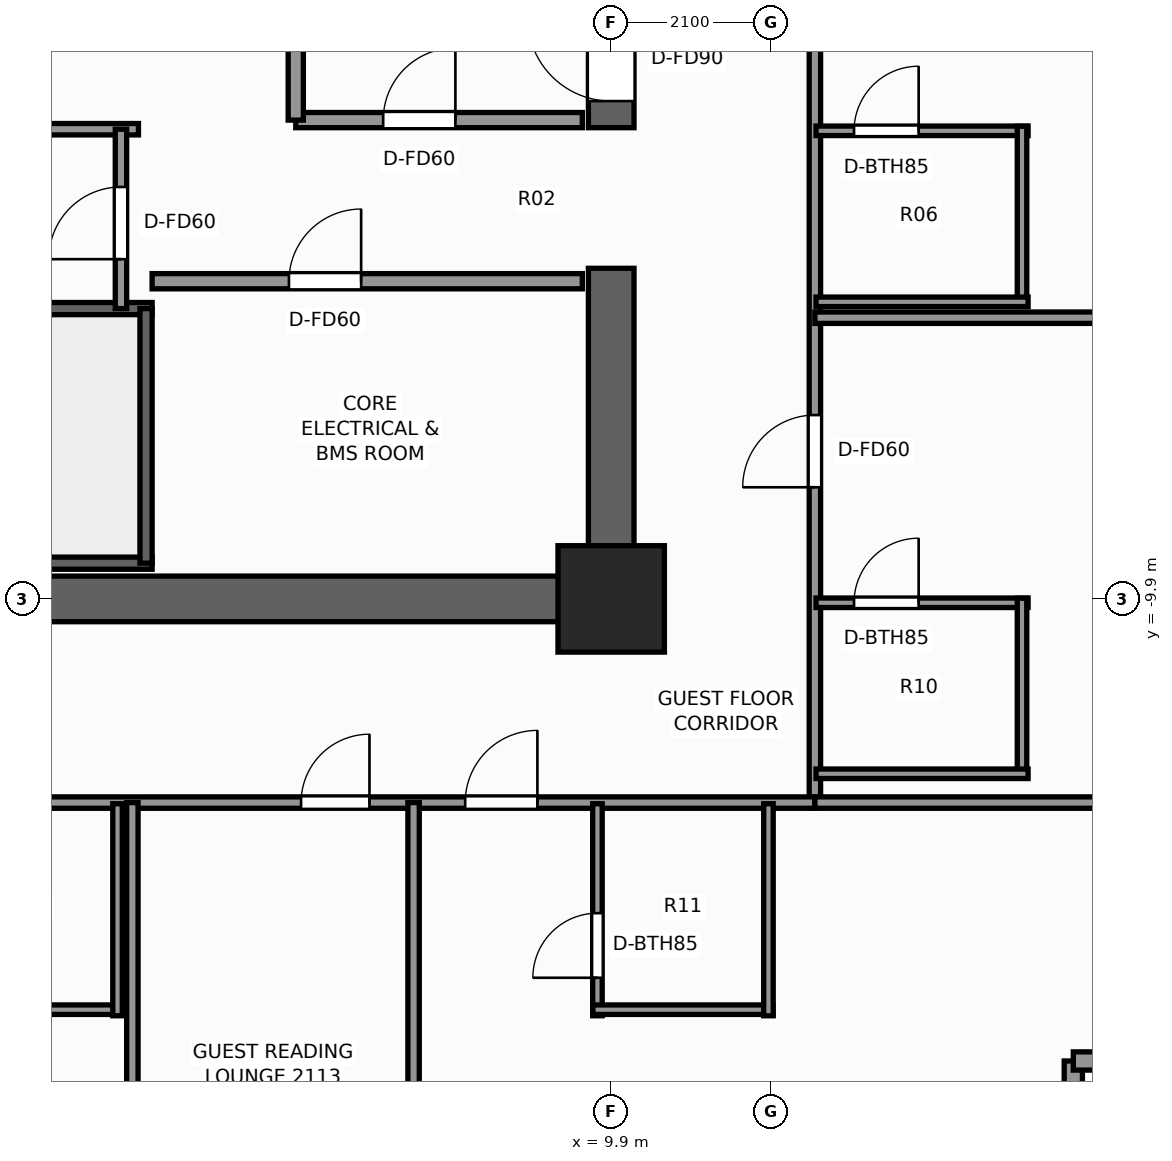
"""IFC4 building model, lengths in metres.
Left out: names, types, materials, properties, quantities, classifications, styles, units other than length and angle.
Written with IfcOpenShell. Run it as: python <this file> out.ifc"""

import sys

from ifc_helpers import new_model, si_unit, direction, frame, frame_2d, origin, origin_2d, place, context, subcontext, project, spatial, rectangle, extrude, element, fill, save


model = new_model("IFC4")
c1 = context("Model", 3, precision=1e-05, world=origin(), true_north=direction((0.0, 1.0)))
c2 = subcontext(c1, "Body", "Model", "MODEL_VIEW")
j1 = project(units=[si_unit("LENGTHUNIT", "METRE"), si_unit("PLANEANGLEUNIT", "RADIAN")], contexts=[c1])
p1 = place(None, origin())
s1 = spatial("IfcSite", under=j1, at=p1, CompositionType="ELEMENT")
p2 = place(p1, origin())
s2 = spatial("IfcBuilding", under=s1, at=p2, CompositionType="ELEMENT")
p3 = place(p2, frame((0.0, 0.0, 75.5)))
s3 = spatial("IfcBuildingStorey", under=s2, at=p3, CompositionType="ELEMENT", Elevation=75.5)
p4 = place(p3, frame((10.2, -9.9, 0.0), z_axis=(0.0, 0.0, 1.0), x_axis=(-1.0, 0.0, 0.0)))
e1 = element("IfcWall", 1, at=p4, inside=s3, PredefinedType="SHEAR", context=c2, shape_type="SweptSolid", body=[
    extrude(rectangle(XDim=12.06, YDim=0.6, at=frame_2d((6.03, 0.0))), origin(), (0.0, 0.0, 1.0), 3.3),
])
p5 = place(p3, frame((9.9, -9.6, 0.0), z_axis=(0.0, 0.0, 1.0), x_axis=(0.0, 1.0, 0.0)))
e2 = element("IfcWall", 2, at=p5, inside=s3, PredefinedType="SHEAR", context=c2, shape_type="SweptSolid", body=[
    extrude(rectangle(XDim=4.05, YDim=0.6, at=frame_2d((2.025, 0.0))), origin(), (0.0, 0.0, 1.0), 3.3),
])
p6 = place(p3, frame((9.9, -3.7, 0.0), z_axis=(0.0, 0.0, 1.0), x_axis=(0.0, 1.0, 0.0)))
e3 = element("IfcWall", 3, at=p6, inside=s3, PredefinedType="SHEAR", context=c2, shape_type="SweptSolid", body=[
    extrude(rectangle(XDim=13.3, YDim=0.6, at=frame_2d((6.65, 0.0))), origin(), (0.0, 0.0, 1.0), 3.3),
])
p7 = place(p6, frame((0.35, 0.0, 0.0)))
e4 = element("IfcOpeningElement", 4, at=p7, cuts=e3, PredefinedType="OPENING", context=c2, shape_type="SweptSolid", body=[
    extrude(rectangle(XDim=1.1, YDim=2.2, at=frame_2d((0.55, 1.1))), frame((0.0, 0.31, 0.0), z_axis=(0.0, -1.0, 0.0), x_axis=(1.0, 0.0, 0.0)), (0.0, 0.0, 1.0), 0.62),
])
p8 = place(p3, frame((9.9, -9.9, 0.0), z_axis=(0.0, 0.0, 1.0), x_axis=(1.0, 0.0, 0.0)))
e5 = element("IfcColumn", 5, at=p8, inside=s3, PredefinedType="COLUMN", context=c2, shape_type="SweptSolid", body=[
    extrude(rectangle(XDim=1.4, YDim=1.4, at=origin_2d()), origin(), (0.0, 0.0, 1.0), 3.3),
])
p9 = place(p3, frame((15.98, -15.98, 0.0), z_axis=(0.0, 0.0, 1.0), x_axis=(0.0, -1.0, 0.0)))
e6 = element("IfcWall", 6, at=p9, inside=s3, PredefinedType="STANDARD", context=c2, shape_type="SweptSolid", body=[
    extrude(rectangle(XDim=2.39, YDim=0.24, at=frame_2d((1.195, 0.0))), origin(), (0.0, 0.0, 1.0), 2.459),
])
p10 = place(p9, frame((0.525, 0.0, 0.65)))
e7 = element("IfcOpeningElement", 7, at=p10, cuts=e6, PredefinedType="OPENING", context=c2, shape_type="SweptSolid", body=[
    extrude(rectangle(XDim=1.1, YDim=1.45, at=frame_2d((0.55, 0.725))), frame((0.0, 0.13, 0.0), z_axis=(0.0, -1.0, 0.0), x_axis=(1.0, 0.0, 0.0)), (0.0, 0.0, 1.0), 0.26),
])
p11 = place(p3, frame((18.37, -15.98, 0.0), z_axis=(0.0, 0.0, 1.0), x_axis=(-1.0, 0.0, 0.0)))
e8 = element("IfcWall", 8, at=p11, inside=s3, PredefinedType="STANDARD", context=c2, shape_type="SweptSolid", body=[
    extrude(rectangle(XDim=2.39, YDim=0.24, at=frame_2d((1.195, 0.0))), origin(), (0.0, 0.0, 1.0), 2.459),
])
p12 = place(p11, frame((0.525, 0.0, 0.65)))
e9 = element("IfcOpeningElement", 9, at=p12, cuts=e8, PredefinedType="OPENING", context=c2, shape_type="SweptSolid", body=[
    extrude(rectangle(XDim=1.1, YDim=1.45, at=frame_2d((0.55, 0.725))), frame((0.0, 0.13, 0.0), z_axis=(0.0, -1.0, 0.0), x_axis=(1.0, 0.0, 0.0)), (0.0, 0.0, 1.0), 0.26),
])
p13 = place(p3, frame((3.86, -9.43, 0.0), z_axis=(0.0, 0.0, 1.0), x_axis=(-1.0, 0.0, 0.0)))
e10 = element("IfcWall", 10, at=p13, inside=s3, PredefinedType="SHEAR", context=c2, shape_type="SweptSolid", body=[
    extrude(rectangle(XDim=7.72, YDim=0.16, at=frame_2d((3.86, 0.0))), origin(), (0.0, 0.0, 1.0), 3.3),
])
p14 = place(p13, frame((6.01, 0.0, 0.0)))
e11 = element("IfcOpeningElement", 11, at=p14, cuts=e10, PredefinedType="OPENING", context=c2, shape_type="SweptSolid", body=[
    extrude(rectangle(XDim=1.1, YDim=2.2, at=frame_2d((0.55, 1.1))), frame((0.0, 0.09, 0.0), z_axis=(0.0, -1.0, 0.0), x_axis=(1.0, 0.0, 0.0)), (0.0, 0.0, 1.0), 0.18),
])
p15 = place(p3, frame((-3.86, -6.08, 0.0), z_axis=(0.0, 0.0, 1.0), x_axis=(1.0, 0.0, 0.0)))
e12 = element("IfcWall", 12, at=p15, inside=s3, PredefinedType="SHEAR", context=c2, shape_type="SweptSolid", body=[
    extrude(rectangle(XDim=7.72, YDim=0.16, at=frame_2d((3.86, 0.0))), origin(), (0.0, 0.0, 1.0), 3.3),
])
p16 = place(p3, frame((3.78, -9.43, 0.0), z_axis=(0.0, 0.0, 1.0), x_axis=(0.0, 1.0, 0.0)))
e13 = element("IfcWall", 13, at=p16, inside=s3, PredefinedType="SHEAR", context=c2, shape_type="SweptSolid", body=[
    extrude(rectangle(XDim=3.35, YDim=0.16, at=frame_2d((1.675, 0.0))), origin(), (0.0, 0.0, 1.0), 3.3),
])
p17 = place(p3, frame((5.75, -3.6, 0.0), z_axis=(0.0, 0.0, 1.0), x_axis=(1.0, 0.0, 0.0)))
e14 = element("IfcWall", 14, at=p17, inside=s3, PredefinedType="SOLIDWALL", context=c2, shape_type="SweptSolid", body=[
    extrude(rectangle(XDim=3.77, YDim=0.2, at=frame_2d((1.885, 0.0))), origin(), (0.0, 0.0, 1.0), 3.08),
])
p18 = place(p17, frame((1.15, 0.0, 0.0)))
e15 = element("IfcOpeningElement", 15, at=p18, cuts=e14, PredefinedType="OPENING", context=c2, shape_type="SweptSolid", body=[
    extrude(rectangle(XDim=0.95, YDim=2.06, at=frame_2d((0.475, 1.03))), frame((0.0, 0.11, 0.0), z_axis=(0.0, -1.0, 0.0), x_axis=(1.0, 0.0, 0.0)), (0.0, 0.0, 1.0), 0.22),
])
p19 = place(p3, frame((5.75, -3.6, 0.0), z_axis=(0.0, 0.0, 1.0), x_axis=(0.0, 1.0, 0.0)))
e16 = element("IfcWall", 16, at=p19, inside=s3, PredefinedType="SOLIDWALL", context=c2, shape_type="SweptSolid", body=[
    extrude(rectangle(XDim=5.57, YDim=0.2, at=frame_2d((2.785, 0.0))), origin(), (0.0, 0.0, 1.0), 3.08),
])
p20 = place(p19, frame((2.75, 0.0, 0.0)))
e17 = element("IfcOpeningElement", 17, at=p20, cuts=e16, PredefinedType="OPENING", context=c2, shape_type="SweptSolid", body=[
    extrude(rectangle(XDim=1.1, YDim=2.2, at=frame_2d((0.55, 1.1))), frame((0.0, 0.11, 0.0), z_axis=(0.0, -1.0, 0.0), x_axis=(1.0, 0.0, 0.0)), (0.0, 0.0, 1.0), 0.22),
])
p21 = place(p3, frame((3.86, -5.72, 0.0), z_axis=(0.0, 0.0, 1.0), x_axis=(1.0, 0.0, 0.0)))
e18 = element("IfcWall", 18, at=p21, inside=s3, PredefinedType="SOLIDWALL", context=c2, shape_type="SweptSolid", body=[
    extrude(rectangle(XDim=5.66, YDim=0.2, at=frame_2d((2.83, 0.0))), origin(), (0.0, 0.0, 1.0), 3.08),
])
p22 = place(p21, frame((1.8, 0.0, 0.0)))
e19 = element("IfcOpeningElement", 19, at=p22, cuts=e18, PredefinedType="OPENING", context=c2, shape_type="SweptSolid", body=[
    extrude(rectangle(XDim=0.95, YDim=2.06, at=frame_2d((0.475, 1.03))), frame((0.0, 0.11, 0.0), z_axis=(0.0, -1.0, 0.0), x_axis=(1.0, 0.0, 0.0)), (0.0, 0.0, 1.0), 0.22),
])
p23 = place(p3, frame((-3.68, -3.72, 0.0), z_axis=(0.0, 0.0, 1.0), x_axis=(1.0, 0.0, 0.0)))
e20 = element("IfcWall", 20, at=p23, inside=s3, PredefinedType="PARTITIONING", context=c2, shape_type="SweptSolid", body=[
    extrude(rectangle(XDim=7.36, YDim=0.15, at=frame_2d((3.68, 0.0))), origin(), (0.0, 0.0, 1.0), 3.08),
])
p24 = place(p3, frame((3.45, -6.08, 0.0), z_axis=(0.0, 0.0, 1.0), x_axis=(0.0, 1.0, 0.0)))
e21 = element("IfcWall", 21, at=p24, inside=s3, PredefinedType="PARTITIONING", context=c2, shape_type="SweptSolid", body=[
    extrude(rectangle(XDim=2.36, YDim=0.15, at=frame_2d((1.18, 0.0))), origin(), (0.0, 0.0, 1.0), 3.08),
])
p25 = place(p24, frame((0.65, 0.0, 0.0)))
e22 = element("IfcOpeningElement", 22, at=p25, cuts=e21, PredefinedType="OPENING", context=c2, shape_type="SweptSolid", body=[
    extrude(rectangle(XDim=0.95, YDim=2.06, at=frame_2d((0.475, 1.03))), frame((0.0, 0.085, 0.0), z_axis=(0.0, -1.0, 0.0), x_axis=(1.0, 0.0, 0.0)), (0.0, 0.0, 1.0), 0.17),
])
p26 = place(p3, frame((12.58, -12.58, 0.0), z_axis=(0.0, 0.0, 1.0), x_axis=(0.0, 1.0, 0.0)))
e23 = element("IfcWall", 23, at=p26, inside=s3, PredefinedType="PARTITIONING", context=c2, shape_type="SweptSolid", body=[
    extrude(rectangle(XDim=24.84, YDim=0.15, at=frame_2d((12.42, 0.0))), origin(), (0.0, 0.0, 1.0), 2.292),
])
p27 = place(p26, frame((4.149, 0.0, 0.0)))
e24 = element("IfcOpeningElement", 24, at=p27, cuts=e23, PredefinedType="OPENING", context=c2, shape_type="SweptSolid", body=[
    extrude(rectangle(XDim=0.95, YDim=2.06, at=frame_2d((0.475, 1.03))), frame((0.0, 0.085, 0.0), z_axis=(0.0, -1.0, 0.0), x_axis=(1.0, 0.0, 0.0)), (0.0, 0.0, 1.0), 0.17),
])
p28 = place(p26, frame((10.28, 0.0, 0.0)))
e25 = element("IfcOpeningElement", 25, at=p28, cuts=e23, PredefinedType="OPENING", context=c2, shape_type="SweptSolid", body=[
    extrude(rectangle(XDim=0.95, YDim=2.06, at=frame_2d((0.475, 1.03))), frame((0.0, 0.085, 0.0), z_axis=(0.0, -1.0, 0.0), x_axis=(1.0, 0.0, 0.0)), (0.0, 0.0, 1.0), 0.17),
])
p29 = place(p26, frame((18.983, 0.0, 0.0)))
e26 = element("IfcOpeningElement", 26, at=p29, cuts=e23, PredefinedType="OPENING", context=c2, shape_type="SweptSolid", body=[
    extrude(rectangle(XDim=0.95, YDim=2.06, at=frame_2d((0.475, 1.03))), frame((0.0, 0.085, 0.0), z_axis=(0.0, -1.0, 0.0), x_axis=(1.0, 0.0, 0.0)), (0.0, 0.0, 1.0), 0.17),
])
p30 = place(p26, frame((20.996, 0.0, 0.0)))
e27 = element("IfcOpeningElement", 27, at=p30, cuts=e23, PredefinedType="OPENING", context=c2, shape_type="SweptSolid", body=[
    extrude(rectangle(XDim=0.9, YDim=2.06, at=frame_2d((0.45, 1.03))), frame((0.0, 0.085, 0.0), z_axis=(0.0, -1.0, 0.0), x_axis=(1.0, 0.0, 0.0)), (0.0, 0.0, 1.0), 0.17),
])
p31 = place(p3, frame((-3.65, -12.58, 0.0), z_axis=(0.0, 0.0, 1.0), x_axis=(1.0, 0.0, 0.0)))
e28 = element("IfcWall", 28, at=p31, inside=s3, PredefinedType="PARTITIONING", context=c2, shape_type="SweptSolid", body=[
    extrude(rectangle(XDim=16.23, YDim=0.15, at=frame_2d((8.115, 0.0))), origin(), (0.0, 0.0, 1.0), 2.292),
])
p32 = place(p31, frame((1.405, 0.0, 0.0)))
e29 = element("IfcOpeningElement", 29, at=p32, cuts=e28, PredefinedType="OPENING", context=c2, shape_type="SweptSolid", body=[
    extrude(rectangle(XDim=0.95, YDim=2.06, at=frame_2d((0.475, 1.03))), frame((0.0, 0.085, 0.0), z_axis=(0.0, -1.0, 0.0), x_axis=(1.0, 0.0, 0.0)), (0.0, 0.0, 1.0), 0.17),
])
p33 = place(p31, frame((9.469, 0.0, 0.0)))
e30 = element("IfcOpeningElement", 30, at=p33, cuts=e28, PredefinedType="OPENING", context=c2, shape_type="SweptSolid", body=[
    extrude(rectangle(XDim=0.9, YDim=2.06, at=frame_2d((0.45, 1.03))), frame((0.0, 0.085, 0.0), z_axis=(0.0, -1.0, 0.0), x_axis=(1.0, 0.0, 0.0)), (0.0, 0.0, 1.0), 0.17),
])
p34 = place(p31, frame((11.629, 0.0, 0.0)))
e31 = element("IfcOpeningElement", 31, at=p34, cuts=e28, PredefinedType="OPENING", context=c2, shape_type="SweptSolid", body=[
    extrude(rectangle(XDim=0.95, YDim=2.06, at=frame_2d((0.475, 1.03))), frame((0.0, 0.085, 0.0), z_axis=(0.0, -1.0, 0.0), x_axis=(1.0, 0.0, 0.0)), (0.0, 0.0, 1.0), 0.17),
])
p35 = place(p3, frame((12.58, -12.58, 0.0), z_axis=(0.0, 0.0, 1.0), x_axis=(1.0, 0.0, 0.0)))
e32 = element("IfcWall", 32, at=p35, inside=s3, PredefinedType="PARTITIONING", context=c2, shape_type="SweptSolid", body=[
    extrude(rectangle(XDim=7.8, YDim=0.15, at=frame_2d((3.9, 0.0))), origin(), (0.0, 0.0, 1.0), 2.292),
])
p36 = place(p3, frame((12.58, -6.2, 0.0), z_axis=(0.0, 0.0, 1.0), x_axis=(1.0, 0.0, 0.0)))
e33 = element("IfcWall", 33, at=p36, inside=s3, PredefinedType="PARTITIONING", context=c2, shape_type="SweptSolid", body=[
    extrude(rectangle(XDim=7.8, YDim=0.15, at=frame_2d((3.9, 0.0))), origin(), (0.0, 0.0, 1.0), 2.449),
])
p37 = place(p3, frame((12.595, -9.951, 0.0), z_axis=(0.0, 0.0, 1.0), x_axis=(1.0, 0.0, 0.0)))
e34 = element("IfcWall", 34, at=p37, inside=s3, PredefinedType="PARTITIONING", context=c2, shape_type="SweptSolid", body=[
    extrude(rectangle(XDim=2.79, YDim=0.125, at=frame_2d((1.395, 0.0))), origin(), (0.0, 0.0, 1.0), 3.08),
])
p38 = place(p37, frame((0.5, 0.0, 0.0)))
e35 = element("IfcOpeningElement", 35, at=p38, cuts=e34, PredefinedType="OPENING", context=c2, shape_type="SweptSolid", body=[
    extrude(rectangle(XDim=0.85, YDim=2.03, at=frame_2d((0.425, 1.015))), frame((0.0, 0.073, 0.0), z_axis=(0.0, -1.0, 0.0), x_axis=(1.0, 0.0, 0.0)), (0.0, 0.0, 1.0), 0.145),
])
p39 = place(p3, frame((15.305, -12.261, 0.0), z_axis=(0.0, 0.0, 1.0), x_axis=(0.0, 1.0, 0.0)))
e36 = element("IfcWall", 36, at=p39, inside=s3, PredefinedType="PARTITIONING", context=c2, shape_type="SweptSolid", body=[
    extrude(rectangle(XDim=2.37, YDim=0.125, at=frame_2d((1.185, 0.0))), origin(), (0.0, 0.0, 1.0), 2.292),
])
p40 = place(p3, frame((12.595, -12.201, 0.0), z_axis=(0.0, 0.0, 1.0), x_axis=(1.0, 0.0, 0.0)))
e37 = element("IfcWall", 37, at=p40, inside=s3, PredefinedType="PARTITIONING", context=c2, shape_type="SweptSolid", body=[
    extrude(rectangle(XDim=2.79, YDim=0.125, at=frame_2d((1.395, 0.0))), origin(), (0.0, 0.0, 1.0), 3.08),
])
p41 = place(p3, frame((12.595, -3.741, 0.0), z_axis=(0.0, 0.0, 1.0), x_axis=(1.0, 0.0, 0.0)))
e38 = element("IfcWall", 38, at=p41, inside=s3, PredefinedType="PARTITIONING", context=c2, shape_type="SweptSolid", body=[
    extrude(rectangle(XDim=2.79, YDim=0.125, at=frame_2d((1.395, 0.0))), origin(), (0.0, 0.0, 1.0), 3.08),
])
p42 = place(p41, frame((0.5, 0.0, 0.0)))
e39 = element("IfcOpeningElement", 39, at=p42, cuts=e38, PredefinedType="OPENING", context=c2, shape_type="SweptSolid", body=[
    extrude(rectangle(XDim=0.85, YDim=2.03, at=frame_2d((0.425, 1.015))), frame((0.0, 0.073, 0.0), z_axis=(0.0, -1.0, 0.0), x_axis=(1.0, 0.0, 0.0)), (0.0, 0.0, 1.0), 0.145),
])
p43 = place(p3, frame((15.305, -6.051, 0.0), z_axis=(0.0, 0.0, 1.0), x_axis=(0.0, 1.0, 0.0)))
e40 = element("IfcWall", 40, at=p43, inside=s3, PredefinedType="PARTITIONING", context=c2, shape_type="SweptSolid", body=[
    extrude(rectangle(XDim=2.37, YDim=0.125, at=frame_2d((1.185, 0.0))), origin(), (0.0, 0.0, 1.0), 2.292),
])
p44 = place(p3, frame((12.595, -5.991, 0.0), z_axis=(0.0, 0.0, 1.0), x_axis=(1.0, 0.0, 0.0)))
e41 = element("IfcWall", 41, at=p44, inside=s3, PredefinedType="PARTITIONING", context=c2, shape_type="SweptSolid", body=[
    extrude(rectangle(XDim=2.79, YDim=0.125, at=frame_2d((1.395, 0.0))), origin(), (0.0, 0.0, 1.0), 3.08),
])
p45 = place(p3, frame((3.6, -20.38, 0.0), z_axis=(0.0, 0.0, 1.0), x_axis=(0.0, 1.0, 0.0)))
e42 = element("IfcWall", 42, at=p45, inside=s3, PredefinedType="PARTITIONING", context=c2, shape_type="SweptSolid", body=[
    extrude(rectangle(XDim=7.8, YDim=0.15, at=frame_2d((3.9, 0.0))), origin(), (0.0, 0.0, 1.0), 2.449),
])
p46 = place(p3, frame((1.095, -15.305, 0.0), z_axis=(0.0, 0.0, 1.0), x_axis=(1.0, 0.0, 0.0)))
e43 = element("IfcWall", 43, at=p46, inside=s3, PredefinedType="PARTITIONING", context=c2, shape_type="SweptSolid", body=[
    extrude(rectangle(XDim=2.37, YDim=0.125, at=frame_2d((1.185, 0.0))), origin(), (0.0, 0.0, 1.0), 2.369),
])
p47 = place(p3, frame((3.405, -15.385, 0.0), z_axis=(0.0, 0.0, 1.0), x_axis=(0.0, 1.0, 0.0)))
e44 = element("IfcWall", 44, at=p47, inside=s3, PredefinedType="PARTITIONING", context=c2, shape_type="SweptSolid", body=[
    extrude(rectangle(XDim=2.79, YDim=0.125, at=frame_2d((1.395, 0.0))), origin(), (0.0, 0.0, 1.0), 3.08),
])
p48 = place(p3, frame((7.3, -20.38, 0.0), z_axis=(0.0, 0.0, 1.0), x_axis=(0.0, 1.0, 0.0)))
e45 = element("IfcWall", 45, at=p48, inside=s3, PredefinedType="PARTITIONING", context=c2, shape_type="SweptSolid", body=[
    extrude(rectangle(XDim=7.8, YDim=0.15, at=frame_2d((3.9, 0.0))), origin(), (0.0, 0.0, 1.0), 2.449),
])
p49 = place(p3, frame((9.719, -15.385, 0.0), z_axis=(0.0, 0.0, 1.0), x_axis=(0.0, 1.0, 0.0)))
e46 = element("IfcWall", 46, at=p49, inside=s3, PredefinedType="PARTITIONING", context=c2, shape_type="SweptSolid", body=[
    extrude(rectangle(XDim=2.79, YDim=0.125, at=frame_2d((1.395, 0.0))), origin(), (0.0, 0.0, 1.0), 3.08),
])
p50 = place(p49, frame((0.5, 0.0, 0.0)))
e47 = element("IfcOpeningElement", 47, at=p50, cuts=e46, PredefinedType="OPENING", context=c2, shape_type="SweptSolid", body=[
    extrude(rectangle(XDim=0.85, YDim=2.03, at=frame_2d((0.425, 1.015))), frame((0.0, 0.073, 0.0), z_axis=(0.0, -1.0, 0.0), x_axis=(1.0, 0.0, 0.0)), (0.0, 0.0, 1.0), 0.145),
])
p51 = place(p3, frame((9.659, -15.305, 0.0), z_axis=(0.0, 0.0, 1.0), x_axis=(1.0, 0.0, 0.0)))
e48 = element("IfcWall", 48, at=p51, inside=s3, PredefinedType="PARTITIONING", context=c2, shape_type="SweptSolid", body=[
    extrude(rectangle(XDim=2.37, YDim=0.125, at=frame_2d((1.185, 0.0))), origin(), (0.0, 0.0, 1.0), 2.292),
])
p52 = place(p3, frame((11.969, -15.385, 0.0), z_axis=(0.0, 0.0, 1.0), x_axis=(0.0, 1.0, 0.0)))
e49 = element("IfcWall", 49, at=p52, inside=s3, PredefinedType="PARTITIONING", context=c2, shape_type="SweptSolid", body=[
    extrude(rectangle(XDim=2.79, YDim=0.125, at=frame_2d((1.395, 0.0))), origin(), (0.0, 0.0, 1.0), 2.292),
])
p53 = place(p7, origin())
e50 = element("IfcDoor", 50, at=p53, inside=s3, OperationType="SINGLE_SWING_RIGHT", PredefinedType="DOOR", context=c2, shape_type="SweptSolid", body=[
    extrude(rectangle(XDim=1.1, YDim=2.2, at=frame_2d((0.55, 1.1))), frame((0.0, 0.025, 0.0), z_axis=(0.0, -1.0, 0.0), x_axis=(1.0, 0.0, 0.0)), (0.0, 0.0, 1.0), 0.05),
])
fill(e4, e50)
p54 = place(p22, origin())
e51 = element("IfcDoor", 51, at=p54, inside=s3, OperationType="SINGLE_SWING_RIGHT", PredefinedType="DOOR", context=c2, shape_type="SweptSolid", body=[
    extrude(rectangle(XDim=0.95, YDim=2.06, at=frame_2d((0.475, 1.03))), frame((0.0, 0.025, 0.0), z_axis=(0.0, -1.0, 0.0), x_axis=(1.0, 0.0, 0.0)), (0.0, 0.0, 1.0), 0.05),
])
fill(e19, e51)
p55 = place(p18, origin())
e52 = element("IfcDoor", 52, at=p55, inside=s3, OperationType="SINGLE_SWING_RIGHT", PredefinedType="DOOR", context=c2, shape_type="SweptSolid", body=[
    extrude(rectangle(XDim=0.95, YDim=2.06, at=frame_2d((0.475, 1.03))), frame((0.0, 0.025, 0.0), z_axis=(0.0, -1.0, 0.0), x_axis=(1.0, 0.0, 0.0)), (0.0, 0.0, 1.0), 0.05),
])
fill(e15, e52)
p56 = place(p25, origin())
e53 = element("IfcDoor", 53, at=p56, inside=s3, OperationType="SINGLE_SWING_LEFT", PredefinedType="DOOR", context=c2, shape_type="SweptSolid", body=[
    extrude(rectangle(XDim=0.95, YDim=2.06, at=frame_2d((0.475, 1.03))), frame((0.0, 0.025, 0.0), z_axis=(0.0, -1.0, 0.0), x_axis=(1.0, 0.0, 0.0)), (0.0, 0.0, 1.0), 0.05),
])
fill(e22, e53)
p57 = place(p38, origin())
e54 = element("IfcDoor", 54, at=p57, inside=s3, OperationType="SINGLE_SWING_RIGHT", PredefinedType="DOOR", context=c2, shape_type="SweptSolid", body=[
    extrude(rectangle(XDim=0.85, YDim=2.03, at=frame_2d((0.425, 1.015))), frame((0.0, 0.025, 0.0), z_axis=(0.0, -1.0, 0.0), x_axis=(1.0, 0.0, 0.0)), (0.0, 0.0, 1.0), 0.05),
])
fill(e35, e54)
p58 = place(p27, origin())
e55 = element("IfcDoor", 55, at=p58, inside=s3, OperationType="SINGLE_SWING_LEFT", PredefinedType="DOOR", context=c2, shape_type="SweptSolid", body=[
    extrude(rectangle(XDim=0.95, YDim=2.06, at=frame_2d((0.475, 1.03))), frame((0.0, 0.025, 0.0), z_axis=(0.0, -1.0, 0.0), x_axis=(1.0, 0.0, 0.0)), (0.0, 0.0, 1.0), 0.05),
])
fill(e24, e55)
p59 = place(p42, origin())
e56 = element("IfcDoor", 56, at=p59, inside=s3, OperationType="SINGLE_SWING_RIGHT", PredefinedType="DOOR", context=c2, shape_type="SweptSolid", body=[
    extrude(rectangle(XDim=0.85, YDim=2.03, at=frame_2d((0.425, 1.015))), frame((0.0, 0.025, 0.0), z_axis=(0.0, -1.0, 0.0), x_axis=(1.0, 0.0, 0.0)), (0.0, 0.0, 1.0), 0.05),
])
fill(e39, e56)
p60 = place(p33, origin())
e57 = element("IfcDoor", 57, at=p60, inside=s3, OperationType="SINGLE_SWING_RIGHT", PredefinedType="DOOR", context=c2, shape_type="SweptSolid", body=[
    extrude(rectangle(XDim=0.9, YDim=2.06, at=frame_2d((0.45, 1.03))), frame((0.0, 0.025, 0.0), z_axis=(0.0, -1.0, 0.0), x_axis=(1.0, 0.0, 0.0)), (0.0, 0.0, 1.0), 0.05),
])
fill(e30, e57)
p61 = place(p50, origin())
e58 = element("IfcDoor", 58, at=p61, inside=s3, OperationType="SINGLE_SWING_LEFT", PredefinedType="DOOR", context=c2, shape_type="SweptSolid", body=[
    extrude(rectangle(XDim=0.85, YDim=2.03, at=frame_2d((0.425, 1.015))), frame((0.0, 0.025, 0.0), z_axis=(0.0, -1.0, 0.0), x_axis=(1.0, 0.0, 0.0)), (0.0, 0.0, 1.0), 0.05),
])
fill(e47, e58)
p62 = place(p34, origin())
e59 = element("IfcDoor", 59, at=p62, inside=s3, OperationType="SINGLE_SWING_RIGHT", PredefinedType="DOOR", context=c2, shape_type="SweptSolid", body=[
    extrude(rectangle(XDim=0.95, YDim=2.06, at=frame_2d((0.475, 1.03))), frame((0.0, 0.025, 0.0), z_axis=(0.0, -1.0, 0.0), x_axis=(1.0, 0.0, 0.0)), (0.0, 0.0, 1.0), 0.05),
])
fill(e31, e59)
save(model, sys.argv[1])
